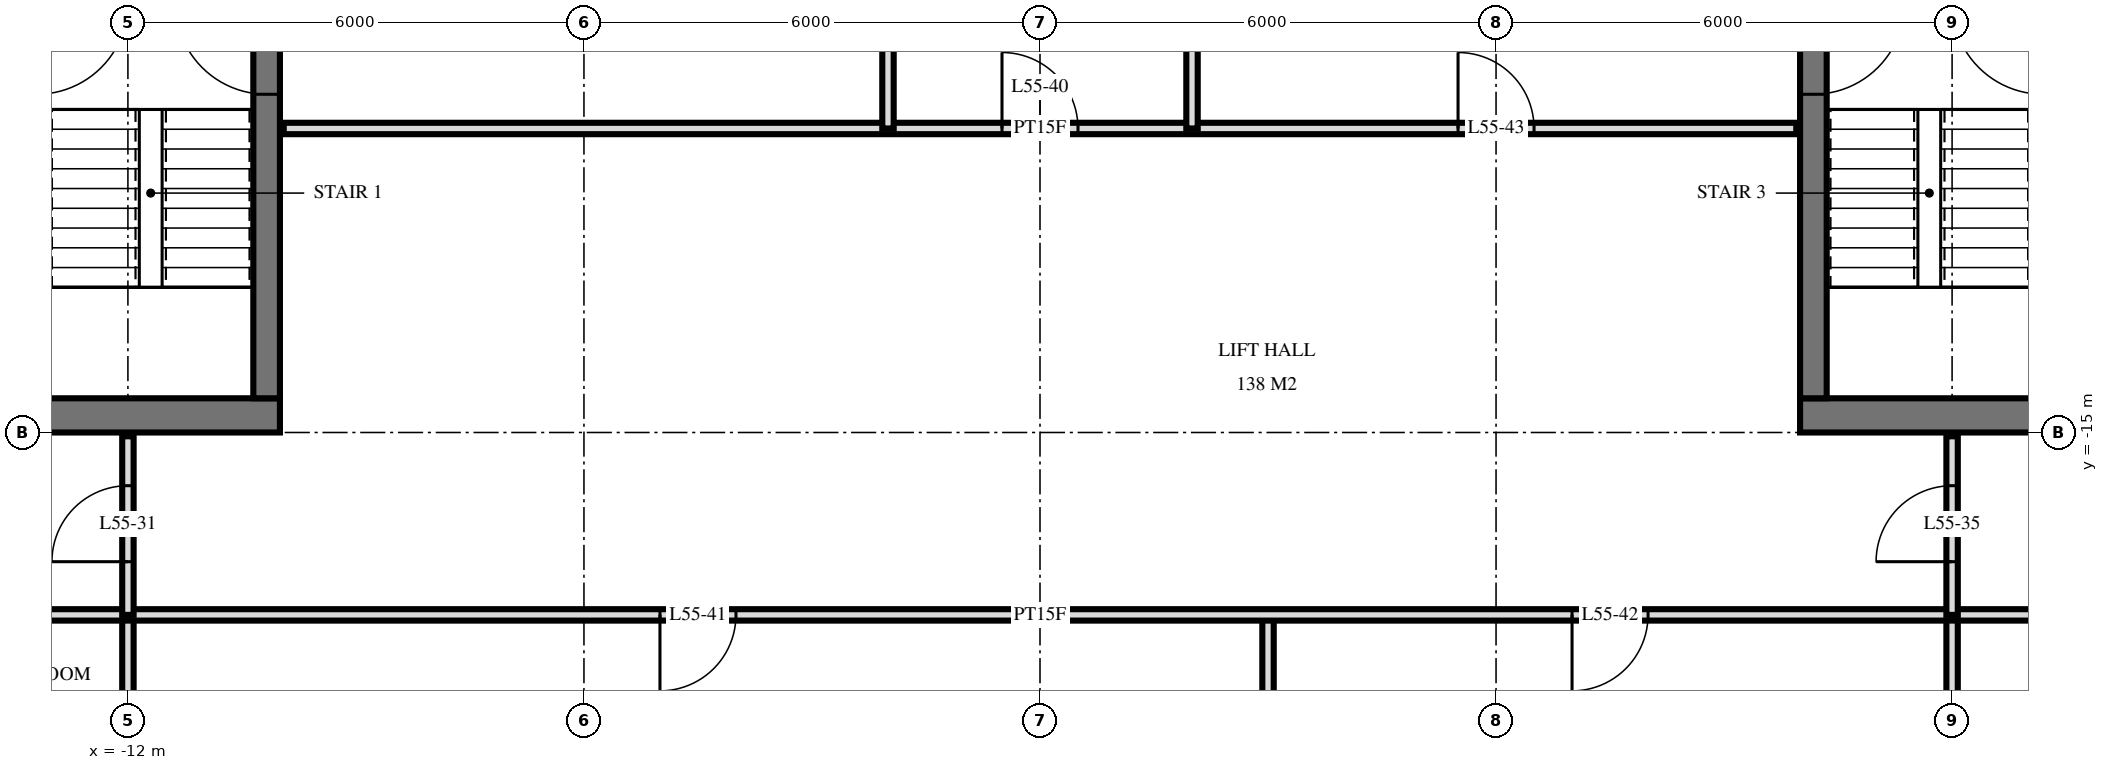
"""IFC4 building model, lengths in metres.
Left out: names, types, materials, properties, quantities, classifications, styles, units other than length and angle.
Written with IfcOpenShell. Run it as: python <this file> out.ifc"""

import sys

from ifc_helpers import new_model, si_unit, direction, frame, frame_2d, origin, place, context, subcontext, project, spatial, rectangle, extrude, element, fill, save


model = new_model("IFC4")
c1 = context("Model", 3, precision=1e-05, world=origin(), true_north=direction((0.0, 1.0)))
c2 = subcontext(c1, "Body", "Model", "MODEL_VIEW")
j1 = project(units=[si_unit("LENGTHUNIT", "METRE"), si_unit("PLANEANGLEUNIT", "RADIAN")], contexts=[c1])
p1 = place(None, origin())
s1 = spatial("IfcSite", under=j1, at=p1, CompositionType="ELEMENT")
p2 = place(p1, origin())
s2 = spatial("IfcBuilding", under=s1, at=p2, CompositionType="ELEMENT")
p3 = place(p2, frame((0.0, 0.0, 211.6)))
s3 = spatial("IfcBuildingStorey", under=s2, at=p3, CompositionType="ELEMENT", Elevation=211.6)
p4 = place(p3, frame((-24.5, -14.775, 0.0), z_axis=(0.0, 0.0, 1.0), x_axis=(1.0, 0.0, 0.0)))
e1 = element("IfcWall", 1, at=p4, inside=s3, PredefinedType="SHEAR", context=c2, shape_type="SweptSolid", body=[
    extrude(rectangle(XDim=14.5, YDim=0.45, at=frame_2d((7.25, 0.0))), origin(), (0.0, 0.0, 1.0), 3.5),
])
p5 = place(p4, frame((6.2, 0.0, 0.0)))
e2 = element("IfcOpeningElement", 2, at=p5, cuts=e1, PredefinedType="OPENING", context=c2, shape_type="SweptSolid", body=[
    extrude(rectangle(XDim=1.2, YDim=2.1, at=frame_2d((0.6, 1.05))), frame((0.0, 0.235, 0.0), z_axis=(0.0, -1.0, 0.0), x_axis=(1.0, 0.0, 0.0)), (0.0, 0.0, 1.0), 0.47),
])
p6 = place(p4, frame((9.25, 0.0, 0.0)))
e3 = element("IfcOpeningElement", 3, at=p6, cuts=e1, PredefinedType="OPENING", context=c2, shape_type="SweptSolid", body=[
    extrude(rectangle(XDim=1.1, YDim=2.1, at=frame_2d((0.55, 1.05))), frame((0.0, 0.235, 0.0), z_axis=(0.0, -1.0, 0.0), x_axis=(1.0, 0.0, 0.0)), (0.0, 0.0, 1.0), 0.47),
])
p7 = place(p4, frame((3.5, 0.0, 0.0)))
e4 = element("IfcOpeningElement", 4, at=p7, cuts=e1, PredefinedType="OPENING", context=c2, shape_type="SweptSolid", body=[
    extrude(rectangle(XDim=0.9, YDim=2.1, at=frame_2d((0.45, 1.05))), frame((0.0, 0.235, 0.0), z_axis=(0.0, -1.0, 0.0), x_axis=(1.0, 0.0, 0.0)), (0.0, 0.0, 1.0), 0.47),
])
p8 = place(p4, frame((1.05, 0.0, 0.0)))
e5 = element("IfcOpeningElement", 5, at=p8, cuts=e1, PredefinedType="OPENING", context=c2, shape_type="SweptSolid", body=[
    extrude(rectangle(XDim=1.0, YDim=2.1, at=frame_2d((0.5, 1.05))), frame((0.0, 0.235, 0.0), z_axis=(0.0, -1.0, 0.0), x_axis=(1.0, 0.0, 0.0)), (0.0, 0.0, 1.0), 0.47),
])
p9 = place(p3, frame((-10.175, -14.55, 0.0), z_axis=(0.0, 0.0, 1.0), x_axis=(0.0, 1.0, 0.0)))
e6 = element("IfcWall", 6, at=p9, inside=s3, PredefinedType="SHEAR", context=c2, shape_type="SweptSolid", body=[
    extrude(rectangle(XDim=14.1, YDim=0.35, at=frame_2d((7.05, 0.0))), origin(), (0.0, 0.0, 1.0), 3.5),
])
p10 = place(p9, frame((8.4, 0.0, 0.0)))
e7 = element("IfcOpeningElement", 7, at=p10, cuts=e6, PredefinedType="OPENING", context=c2, shape_type="SweptSolid", body=[
    extrude(rectangle(XDim=1.4, YDim=2.4, at=frame_2d((0.7, 1.2))), frame((0.0, 0.185, 0.0), z_axis=(0.0, -1.0, 0.0), x_axis=(1.0, 0.0, 0.0)), (0.0, 0.0, 1.0), 0.37),
])
p11 = place(p9, frame((10.0, 0.0, 0.0)))
e8 = element("IfcOpeningElement", 8, at=p11, cuts=e6, PredefinedType="OPENING", context=c2, shape_type="SweptSolid", body=[
    extrude(rectangle(XDim=1.4, YDim=2.4, at=frame_2d((0.7, 1.2))), frame((0.0, 0.185, 0.0), z_axis=(0.0, -1.0, 0.0), x_axis=(1.0, 0.0, 0.0)), (0.0, 0.0, 1.0), 0.37),
])
p12 = place(p9, frame((4.0, 0.0, 0.0)))
e9 = element("IfcOpeningElement", 9, at=p12, cuts=e6, PredefinedType="OPENING", context=c2, shape_type="SweptSolid", body=[
    extrude(rectangle(XDim=1.2, YDim=2.1, at=frame_2d((0.6, 1.05))), frame((0.0, 0.185, 0.0), z_axis=(0.0, -1.0, 0.0), x_axis=(1.0, 0.0, 0.0)), (0.0, 0.0, 1.0), 0.37),
])
p13 = place(p3, frame((10.0, -14.775, 0.0), z_axis=(0.0, 0.0, 1.0), x_axis=(1.0, 0.0, 0.0)))
e10 = element("IfcWall", 10, at=p13, inside=s3, PredefinedType="SHEAR", context=c2, shape_type="SweptSolid", body=[
    extrude(rectangle(XDim=14.5, YDim=0.45, at=frame_2d((7.25, 0.0))), origin(), (0.0, 0.0, 1.0), 3.5),
])
p14 = place(p13, frame((7.1, 0.0, 0.0)))
e11 = element("IfcOpeningElement", 11, at=p14, cuts=e10, PredefinedType="OPENING", context=c2, shape_type="SweptSolid", body=[
    extrude(rectangle(XDim=1.2, YDim=2.1, at=frame_2d((0.6, 1.05))), frame((0.0, 0.235, 0.0), z_axis=(0.0, -1.0, 0.0), x_axis=(1.0, 0.0, 0.0)), (0.0, 0.0, 1.0), 0.47),
])
p15 = place(p13, frame((4.15, 0.0, 0.0)))
e12 = element("IfcOpeningElement", 12, at=p15, cuts=e10, PredefinedType="OPENING", context=c2, shape_type="SweptSolid", body=[
    extrude(rectangle(XDim=1.1, YDim=2.1, at=frame_2d((0.55, 1.05))), frame((0.0, 0.235, 0.0), z_axis=(0.0, -1.0, 0.0), x_axis=(1.0, 0.0, 0.0)), (0.0, 0.0, 1.0), 0.47),
])
p16 = place(p13, frame((10.1, 0.0, 0.0)))
e13 = element("IfcOpeningElement", 13, at=p16, cuts=e10, PredefinedType="OPENING", context=c2, shape_type="SweptSolid", body=[
    extrude(rectangle(XDim=0.9, YDim=2.1, at=frame_2d((0.45, 1.05))), frame((0.0, 0.235, 0.0), z_axis=(0.0, -1.0, 0.0), x_axis=(1.0, 0.0, 0.0)), (0.0, 0.0, 1.0), 0.47),
])
p17 = place(p13, frame((12.45, 0.0, 0.0)))
e14 = element("IfcOpeningElement", 14, at=p17, cuts=e10, PredefinedType="OPENING", context=c2, shape_type="SweptSolid", body=[
    extrude(rectangle(XDim=1.0, YDim=2.1, at=frame_2d((0.5, 1.05))), frame((0.0, 0.235, 0.0), z_axis=(0.0, -1.0, 0.0), x_axis=(1.0, 0.0, 0.0)), (0.0, 0.0, 1.0), 0.47),
])
p18 = place(p3, frame((10.175, -14.55, 0.0), z_axis=(0.0, 0.0, 1.0), x_axis=(0.0, 1.0, 0.0)))
e15 = element("IfcWall", 15, at=p18, inside=s3, PredefinedType="SHEAR", context=c2, shape_type="SweptSolid", body=[
    extrude(rectangle(XDim=14.1, YDim=0.35, at=frame_2d((7.05, 0.0))), origin(), (0.0, 0.0, 1.0), 3.5),
])
p19 = place(p18, frame((8.4, 0.0, 0.0)))
e16 = element("IfcOpeningElement", 16, at=p19, cuts=e15, PredefinedType="OPENING", context=c2, shape_type="SweptSolid", body=[
    extrude(rectangle(XDim=1.4, YDim=2.4, at=frame_2d((0.7, 1.2))), frame((0.0, 0.185, 0.0), z_axis=(0.0, -1.0, 0.0), x_axis=(1.0, 0.0, 0.0)), (0.0, 0.0, 1.0), 0.37),
])
p20 = place(p18, frame((10.0, 0.0, 0.0)))
e17 = element("IfcOpeningElement", 17, at=p20, cuts=e15, PredefinedType="OPENING", context=c2, shape_type="SweptSolid", body=[
    extrude(rectangle(XDim=1.4, YDim=2.4, at=frame_2d((0.7, 1.2))), frame((0.0, 0.185, 0.0), z_axis=(0.0, -1.0, 0.0), x_axis=(1.0, 0.0, 0.0)), (0.0, 0.0, 1.0), 0.37),
])
p21 = place(p18, frame((4.0, 0.0, 0.0)))
e18 = element("IfcOpeningElement", 18, at=p21, cuts=e15, PredefinedType="OPENING", context=c2, shape_type="SweptSolid", body=[
    extrude(rectangle(XDim=1.2, YDim=2.1, at=frame_2d((0.6, 1.05))), frame((0.0, 0.185, 0.0), z_axis=(0.0, -1.0, 0.0), x_axis=(1.0, 0.0, 0.0)), (0.0, 0.0, 1.0), 0.37),
])
p22 = place(p3, frame((12.0, -17.4, 0.0), z_axis=(0.0, 0.0, 1.0), x_axis=(0.0, 1.0, 0.0)))
e19 = element("IfcWall", 19, at=p22, inside=s3, PredefinedType="PARTITIONING", context=c2, shape_type="SweptSolid", body=[
    extrude(rectangle(XDim=2.35, YDim=0.15, at=frame_2d((1.175, 0.0))), origin(), (0.0, 0.0, 1.0), 3.22),
])
p23 = place(p22, frame((0.7, 0.0, 0.0)))
e20 = element("IfcOpeningElement", 20, at=p23, cuts=e19, PredefinedType="OPENING", context=c2, shape_type="SweptSolid", body=[
    extrude(rectangle(XDim=1.0, YDim=2.1, at=frame_2d((0.5, 1.05))), frame((0.0, 0.085, 0.0), z_axis=(0.0, -1.0, 0.0), x_axis=(1.0, 0.0, 0.0)), (0.0, 0.0, 1.0), 0.17),
])
for number, where, z_axis, x_axis in (
    (21, (12.0, -29.22, 0.0), (0.0, 0.0, 1.0), (0.0, 1.0, 0.0)),
    (22, (3.0, -29.22, 0.0), (0.0, 0.0, 1.0), (0.0, 1.0, 0.0)),
):
    element("IfcWall", number, at=place(p3, frame(where, z_axis=z_axis, x_axis=x_axis)), inside=s3, PredefinedType="PARTITIONING", context=c2, shape_type="SweptSolid", body=[
        extrude(rectangle(XDim=11.82, YDim=0.15, at=frame_2d((5.91, 0.0))), origin(), (0.0, 0.0, 1.0), 3.22),
    ])
for number, where, z_axis, x_axis in (
    (23, (2.0, -11.0, 0.0), (0.0, 0.0, 1.0), (0.0, 1.0, 0.0)),
    (24, (-2.0, -11.0, 0.0), (0.0, 0.0, 1.0), (0.0, 1.0, 0.0)),
):
    element("IfcWall", number, at=place(p3, frame(where, z_axis=z_axis, x_axis=x_axis)), inside=s3, PredefinedType="PARTITIONING", context=c2, shape_type="SweptSolid", body=[
        extrude(rectangle(XDim=4.0, YDim=0.15, at=frame_2d((2.0, 0.0))), origin(), (0.0, 0.0, 1.0), 3.22),
    ])
p24 = place(p3, frame((-12.0, -17.4, 0.0), z_axis=(0.0, 0.0, 1.0), x_axis=(0.0, 1.0, 0.0)))
e25 = element("IfcWall", 25, at=p24, inside=s3, PredefinedType="PARTITIONING", context=c2, shape_type="SweptSolid", body=[
    extrude(rectangle(XDim=2.35, YDim=0.15, at=frame_2d((1.175, 0.0))), origin(), (0.0, 0.0, 1.0), 3.22),
])
p25 = place(p24, frame((0.7, 0.0, 0.0)))
e26 = element("IfcOpeningElement", 26, at=p25, cuts=e25, PredefinedType="OPENING", context=c2, shape_type="SweptSolid", body=[
    extrude(rectangle(XDim=1.0, YDim=2.1, at=frame_2d((0.5, 1.05))), frame((0.0, 0.085, 0.0), z_axis=(0.0, -1.0, 0.0), x_axis=(1.0, 0.0, 0.0)), (0.0, 0.0, 1.0), 0.17),
])
p26 = place(p3, frame((-12.0, -29.22, 0.0), z_axis=(0.0, 0.0, 1.0), x_axis=(0.0, 1.0, 0.0)))
e27 = element("IfcWall", 27, at=p26, inside=s3, PredefinedType="PARTITIONING", context=c2, shape_type="SweptSolid", body=[
    extrude(rectangle(XDim=11.82, YDim=0.15, at=frame_2d((5.91, 0.0))), origin(), (0.0, 0.0, 1.0), 3.22),
])
p27 = place(p3, frame((-26.82, -17.4, 0.0), z_axis=(0.0, 0.0, 1.0), x_axis=(1.0, 0.0, 0.0)))
e28 = element("IfcWall", 28, at=p27, inside=s3, PredefinedType="PARTITIONING", context=c2, shape_type="SweptSolid", body=[
    extrude(rectangle(XDim=53.64, YDim=0.15, at=frame_2d((26.82, 0.0))), origin(), (0.0, 0.0, 1.0), 3.22),
])
p28 = place(p27, frame((4.92, 0.0, 0.0)))
e29 = element("IfcOpeningElement", 29, at=p28, cuts=e28, PredefinedType="OPENING", context=c2, shape_type="SweptSolid", body=[
    extrude(rectangle(XDim=1.0, YDim=2.1, at=frame_2d((0.5, 1.05))), frame((0.0, 0.085, 0.0), z_axis=(0.0, -1.0, 0.0), x_axis=(1.0, 0.0, 0.0)), (0.0, 0.0, 1.0), 0.17),
])
p29 = place(p27, frame((1.62, 0.0, 0.0)))
e30 = element("IfcOpeningElement", 30, at=p29, cuts=e28, PredefinedType="OPENING", context=c2, shape_type="SweptSolid", body=[
    extrude(rectangle(XDim=1.0, YDim=2.1, at=frame_2d((0.5, 1.05))), frame((0.0, 0.085, 0.0), z_axis=(0.0, -1.0, 0.0), x_axis=(1.0, 0.0, 0.0)), (0.0, 0.0, 1.0), 0.17),
])
p30 = place(p27, frame((41.17, 0.0, 0.0)))
e31 = element("IfcOpeningElement", 31, at=p30, cuts=e28, PredefinedType="OPENING", context=c2, shape_type="SweptSolid", body=[
    extrude(rectangle(XDim=1.0, YDim=2.1, at=frame_2d((0.5, 1.05))), frame((0.0, 0.085, 0.0), z_axis=(0.0, -1.0, 0.0), x_axis=(1.0, 0.0, 0.0)), (0.0, 0.0, 1.0), 0.17),
])
p31 = place(p27, frame((49.42, 0.0, 0.0)))
e32 = element("IfcOpeningElement", 32, at=p31, cuts=e28, PredefinedType="OPENING", context=c2, shape_type="SweptSolid", body=[
    extrude(rectangle(XDim=1.0, YDim=2.1, at=frame_2d((0.5, 1.05))), frame((0.0, 0.085, 0.0), z_axis=(0.0, -1.0, 0.0), x_axis=(1.0, 0.0, 0.0)), (0.0, 0.0, 1.0), 0.17),
])
p32 = place(p27, frame((47.62, 0.0, 0.0)))
e33 = element("IfcOpeningElement", 33, at=p32, cuts=e28, PredefinedType="OPENING", context=c2, shape_type="SweptSolid", body=[
    extrude(rectangle(XDim=1.0, YDim=2.1, at=frame_2d((0.5, 1.05))), frame((0.0, 0.085, 0.0), z_axis=(0.0, -1.0, 0.0), x_axis=(1.0, 0.0, 0.0)), (0.0, 0.0, 1.0), 0.17),
])
p33 = place(p27, frame((21.82, 0.0, 0.0)))
e34 = element("IfcOpeningElement", 34, at=p33, cuts=e28, PredefinedType="OPENING", context=c2, shape_type="SweptSolid", body=[
    extrude(rectangle(XDim=1.0, YDim=2.1, at=frame_2d((0.5, 1.05))), frame((0.0, 0.085, 0.0), z_axis=(0.0, -1.0, 0.0), x_axis=(1.0, 0.0, 0.0)), (0.0, 0.0, 1.0), 0.17),
])
p34 = place(p27, frame((33.82, 0.0, 0.0)))
e35 = element("IfcOpeningElement", 35, at=p34, cuts=e28, PredefinedType="OPENING", context=c2, shape_type="SweptSolid", body=[
    extrude(rectangle(XDim=1.0, YDim=2.1, at=frame_2d((0.5, 1.05))), frame((0.0, 0.085, 0.0), z_axis=(0.0, -1.0, 0.0), x_axis=(1.0, 0.0, 0.0)), (0.0, 0.0, 1.0), 0.17),
])
p35 = place(p3, frame((-9.95, -11.0, 0.0), z_axis=(0.0, 0.0, 1.0), x_axis=(1.0, 0.0, 0.0)))
e36 = element("IfcWall", 36, at=p35, inside=s3, PredefinedType="PARTITIONING", context=c2, shape_type="SweptSolid", body=[
    extrude(rectangle(XDim=19.9, YDim=0.15, at=frame_2d((9.95, 0.0))), origin(), (0.0, 0.0, 1.0), 3.22),
])
p36 = place(p35, frame((9.45, 0.0, 0.0)))
e37 = element("IfcOpeningElement", 37, at=p36, cuts=e36, PredefinedType="OPENING", context=c2, shape_type="SweptSolid", body=[
    extrude(rectangle(XDim=1.0, YDim=2.1, at=frame_2d((0.5, 1.05))), frame((0.0, 0.085, 0.0), z_axis=(0.0, -1.0, 0.0), x_axis=(1.0, 0.0, 0.0)), (0.0, 0.0, 1.0), 0.17),
])
p37 = place(p35, frame((15.45, 0.0, 0.0)))
e38 = element("IfcOpeningElement", 38, at=p37, cuts=e36, PredefinedType="OPENING", context=c2, shape_type="SweptSolid", body=[
    extrude(rectangle(XDim=1.0, YDim=2.1, at=frame_2d((0.5, 1.05))), frame((0.0, 0.085, 0.0), z_axis=(0.0, -1.0, 0.0), x_axis=(1.0, 0.0, 0.0)), (0.0, 0.0, 1.0), 0.17),
])
p38 = place(p12, origin())
e39 = element("IfcDoor", 39, at=p38, inside=s3, OperationType="SINGLE_SWING_LEFT", PredefinedType="DOOR", context=c2, shape_type="SweptSolid", body=[
    extrude(rectangle(XDim=1.2, YDim=2.1, at=frame_2d((0.6, 1.05))), frame((0.0, 0.025, 0.0), z_axis=(0.0, -1.0, 0.0), x_axis=(1.0, 0.0, 0.0)), (0.0, 0.0, 1.0), 0.05),
])
fill(e9, e39)
p39 = place(p21, frame((0.6, 0.0, 0.0), z_axis=(0.0, 0.0, 1.0), x_axis=(-1.0, 0.0, 0.0)))
e40 = element("IfcDoor", 40, at=p39, inside=s3, OperationType="SINGLE_SWING_RIGHT", PredefinedType="DOOR", context=c2, shape_type="SweptSolid", body=[
    extrude(rectangle(XDim=1.2, YDim=2.1, at=frame_2d((0.0, 1.05))), frame((0.0, -0.025, 0.0), z_axis=(0.0, 1.0, 0.0), x_axis=(-1.0, 0.0, 0.0)), (0.0, 0.0, 1.0), 0.05),
])
fill(e18, e40)
p40 = place(p25, origin())
e41 = element("IfcDoor", 41, at=p40, inside=s3, OperationType="SINGLE_SWING_RIGHT", PredefinedType="DOOR", context=c2, shape_type="SweptSolid", body=[
    extrude(rectangle(XDim=1.0, YDim=2.1, at=frame_2d((0.5, 1.05))), frame((0.0, 0.025, 0.0), z_axis=(0.0, -1.0, 0.0), x_axis=(1.0, 0.0, 0.0)), (0.0, 0.0, 1.0), 0.05),
])
fill(e26, e41)
p41 = place(p23, origin())
e42 = element("IfcDoor", 42, at=p41, inside=s3, OperationType="SINGLE_SWING_RIGHT", PredefinedType="DOOR", context=c2, shape_type="SweptSolid", body=[
    extrude(rectangle(XDim=1.0, YDim=2.1, at=frame_2d((0.5, 1.05))), frame((0.0, 0.025, 0.0), z_axis=(0.0, -1.0, 0.0), x_axis=(1.0, 0.0, 0.0)), (0.0, 0.0, 1.0), 0.05),
])
fill(e20, e42)
p42 = place(p36, origin())
e43 = element("IfcDoor", 43, at=p42, inside=s3, OperationType="SINGLE_SWING_RIGHT", PredefinedType="DOOR", context=c2, shape_type="SweptSolid", body=[
    extrude(rectangle(XDim=1.0, YDim=2.1, at=frame_2d((0.5, 1.05))), frame((0.0, 0.025, 0.0), z_axis=(0.0, -1.0, 0.0), x_axis=(1.0, 0.0, 0.0)), (0.0, 0.0, 1.0), 0.05),
])
fill(e37, e43)
p43 = place(p33, frame((0.5, 0.0, 0.0), z_axis=(0.0, 0.0, 1.0), x_axis=(-1.0, 0.0, 0.0)))
e44 = element("IfcDoor", 44, at=p43, inside=s3, OperationType="SINGLE_SWING_LEFT", PredefinedType="DOOR", context=c2, shape_type="SweptSolid", body=[
    extrude(rectangle(XDim=1.0, YDim=2.1, at=frame_2d((0.0, 1.05))), frame((0.0, -0.025, 0.0), z_axis=(0.0, 1.0, 0.0), x_axis=(-1.0, 0.0, 0.0)), (0.0, 0.0, 1.0), 0.05),
])
fill(e34, e44)
p44 = place(p34, frame((0.5, 0.0, 0.0), z_axis=(0.0, 0.0, 1.0), x_axis=(-1.0, 0.0, 0.0)))
e45 = element("IfcDoor", 45, at=p44, inside=s3, OperationType="SINGLE_SWING_LEFT", PredefinedType="DOOR", context=c2, shape_type="SweptSolid", body=[
    extrude(rectangle(XDim=1.0, YDim=2.1, at=frame_2d((0.0, 1.05))), frame((0.0, -0.025, 0.0), z_axis=(0.0, 1.0, 0.0), x_axis=(-1.0, 0.0, 0.0)), (0.0, 0.0, 1.0), 0.05),
])
fill(e35, e45)
p45 = place(p37, origin())
e46 = element("IfcDoor", 46, at=p45, inside=s3, OperationType="SINGLE_SWING_RIGHT", PredefinedType="DOOR", context=c2, shape_type="SweptSolid", body=[
    extrude(rectangle(XDim=1.0, YDim=2.1, at=frame_2d((0.5, 1.05))), frame((0.0, 0.025, 0.0), z_axis=(0.0, -1.0, 0.0), x_axis=(1.0, 0.0, 0.0)), (0.0, 0.0, 1.0), 0.05),
])
fill(e38, e46)
save(model, sys.argv[1])
